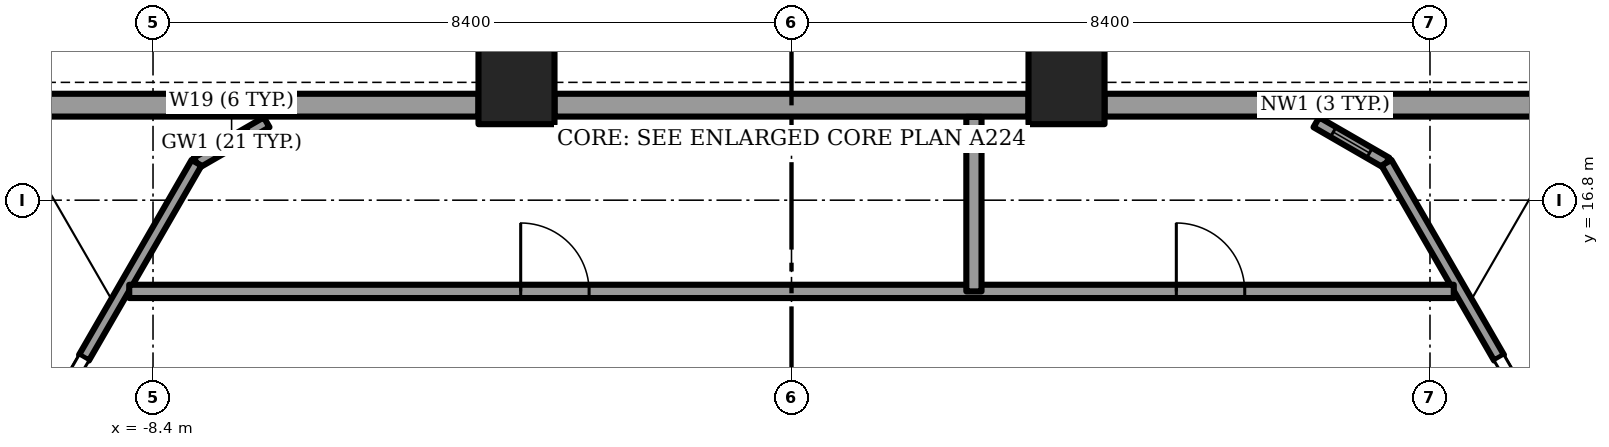
"""IFC4 building model, lengths in metres.
Left out: names, types, materials, properties, quantities, classifications, styles, units other than length and angle.
Written with IfcOpenShell. Run it as: python <this file> out.ifc"""

import sys

from ifc_helpers import new_model, si_unit, direction, frame, frame_2d, origin, origin_2d, place, context, subcontext, project, spatial, rectangle, extrude, element, fill, save


model = new_model("IFC4")
c1 = context("Model", 3, precision=1e-05, world=origin(), true_north=direction((0.0, 1.0)))
c2 = subcontext(c1, "Body", "Model", "MODEL_VIEW")
j1 = project(units=[si_unit("LENGTHUNIT", "METRE"), si_unit("PLANEANGLEUNIT", "RADIAN")], contexts=[c1])
p1 = place(None, origin())
s1 = spatial("IfcSite", under=j1, at=p1, CompositionType="ELEMENT")
p2 = place(p1, origin())
s2 = spatial("IfcBuilding", under=s1, at=p2, CompositionType="ELEMENT")
p3 = place(p2, frame((0.0, 0.0, 151.0)))
s3 = spatial("IfcBuildingStorey", under=s2, at=p3, CompositionType="ELEMENT", Elevation=151.0)
for number, where, z_axis, x_axis in (
    (1, (3.618, 18.3, -1.2), (0.0, 0.0, 1.0), (1.0, 0.0, 0.0)),
    (2, (-3.618, 18.3, -1.2), (0.0, 0.0, 1.0), (1.0, 0.0, 0.0)),
):
    element("IfcColumn", number, at=place(p3, frame(where, z_axis=z_axis, x_axis=x_axis)), inside=s3, PredefinedType="COLUMN", context=c2, shape_type="SweptSolid", body=[
        extrude(rectangle(XDim=1.0, YDim=1.0, at=origin_2d()), origin(), (0.0, 0.0, 1.0), 6.0),
    ])
p4 = place(p3, frame((9.919, 18.05, 0.0), z_axis=(0.0, 0.0, 1.0), x_axis=(-1.0, 0.0, 0.0)))
e3 = element("IfcWall", 3, at=p4, inside=s3, PredefinedType="SOLIDWALL", context=c2, shape_type="SweptSolid", body=[
    extrude(rectangle(XDim=5.801, YDim=0.3, at=frame_2d((2.9, 0.0))), origin(), (0.0, 0.0, 1.0), 4.8),
])
p5 = place(p3, frame((3.118, 18.05, 0.0), z_axis=(0.0, 0.0, 1.0), x_axis=(-1.0, 0.0, 0.0)))
e4 = element("IfcWall", 4, at=p5, inside=s3, PredefinedType="SOLIDWALL", context=c2, shape_type="SweptSolid", body=[
    extrude(rectangle(XDim=6.236, YDim=0.3, at=frame_2d((3.118, 0.0))), origin(), (0.0, 0.0, 1.0), 4.8),
])
p6 = place(p3, frame((-4.118, 18.05, 0.0), z_axis=(0.0, 0.0, 1.0), x_axis=(-1.0, 0.0, 0.0)))
e5 = element("IfcWall", 5, at=p6, inside=s3, PredefinedType="SOLIDWALL", context=c2, shape_type="SweptSolid", body=[
    extrude(rectangle(XDim=5.801, YDim=0.3, at=frame_2d((2.9, 0.0))), origin(), (0.0, 0.0, 1.0), 4.8),
])
for number, where, z_axis, x_axis in (
    (6, (-7.827, 17.292, 0.0), (0.0, 0.0, 1.0), (-0.5, -0.866, 0.0)),
    (7, (9.308, 14.727, 0.0), (0.0, 0.0, 1.0), (-0.5, 0.866, 0.0)),
):
    element("IfcWall", number, at=place(p3, frame(where, z_axis=z_axis, x_axis=x_axis)), inside=s3, PredefinedType="SOLIDWALL", context=c2, shape_type="SweptSolid", body=[
        extrude(rectangle(XDim=2.962, YDim=0.15, at=frame_2d((1.481, 0.0))), origin(), (0.0, 0.0, 1.0), 5.7),
    ])
p7 = place(p3, frame((-6.905, 17.825, 0.0), z_axis=(0.0, 0.0, 1.0), x_axis=(-0.866048165231, -0.499960573946, 0.0)))
e8 = element("IfcWall", 8, at=p7, inside=s3, PredefinedType="SOLIDWALL", context=c2, shape_type="SweptSolid", body=[
    extrude(rectangle(XDim=1.065, YDim=0.15, at=frame_2d((0.532, 0.0))), origin(), (0.0, 0.0, 1.0), 5.7),
])
p8 = place(p7, frame((0.258, 0.0, 0.15)))
e9 = element("IfcOpeningElement", 9, at=p8, cuts=e8, PredefinedType="OPENING", context=c2, shape_type="SweptSolid", body=[
    extrude(rectangle(XDim=0.55, YDim=5.1, at=frame_2d((0.275, 2.55))), frame((0.0, 0.075, 0.0), z_axis=(0.0, -1.0, 0.0), x_axis=(1.0, 0.0, 0.0)), (0.0, 0.0, 1.0), 0.15),
])
p9 = place(p3, frame((7.827, 17.292, 0.0), z_axis=(0.0, 0.0, 1.0), x_axis=(-0.866048165231, 0.499960573946, 0.0)))
e10 = element("IfcWall", 10, at=p9, inside=s3, PredefinedType="SOLIDWALL", context=c2, shape_type="SweptSolid", body=[
    extrude(rectangle(XDim=1.065, YDim=0.15, at=frame_2d((0.532, 0.0))), origin(), (0.0, 0.0, 1.0), 5.7),
])
p10 = place(p9, frame((0.258, 0.0, 0.15)))
e11 = element("IfcOpeningElement", 11, at=p10, cuts=e10, PredefinedType="OPENING", context=c2, shape_type="SweptSolid", body=[
    extrude(rectangle(XDim=0.55, YDim=5.1, at=frame_2d((0.275, 2.55))), frame((0.0, 0.075, 0.0), z_axis=(0.0, -1.0, 0.0), x_axis=(1.0, 0.0, 0.0)), (0.0, 0.0, 1.0), 0.15),
])
p11 = place(p3, frame((-8.713, 15.6, 0.0), z_axis=(0.0, 0.0, 1.0), x_axis=(1.0, 0.0, 0.0)))
e12 = element("IfcWall", 12, at=p11, inside=s3, PredefinedType="PARTITIONING", context=c2, shape_type="SweptSolid", body=[
    extrude(rectangle(XDim=17.426, YDim=0.175, at=frame_2d((8.713, 0.0))), origin(), (0.0, 0.0, 1.0), 5.7),
])
p12 = place(p11, frame((5.15, 0.0, 0.0)))
e13 = element("IfcOpeningElement", 13, at=p12, cuts=e12, PredefinedType="OPENING", context=c2, shape_type="SweptSolid", body=[
    extrude(rectangle(XDim=0.9, YDim=2.1, at=frame_2d((0.45, 1.05))), frame((0.0, 0.087, 0.0), z_axis=(0.0, -1.0, 0.0), x_axis=(1.0, 0.0, 0.0)), (0.0, 0.0, 1.0), 0.175),
])
p13 = place(p11, frame((13.776, 0.0, 0.0)))
e14 = element("IfcOpeningElement", 14, at=p13, cuts=e12, PredefinedType="OPENING", context=c2, shape_type="SweptSolid", body=[
    extrude(rectangle(XDim=0.9, YDim=2.1, at=frame_2d((0.45, 1.05))), frame((0.0, 0.087, 0.0), z_axis=(0.0, -1.0, 0.0), x_axis=(1.0, 0.0, 0.0)), (0.0, 0.0, 1.0), 0.175),
])
p14 = place(p3, frame((2.4, 15.6, 0.0), z_axis=(0.0, 0.0, 1.0), x_axis=(0.0, 1.0, 0.0)))
e15 = element("IfcWall", 15, at=p14, inside=s3, PredefinedType="PARTITIONING", context=c2, shape_type="SweptSolid", body=[
    extrude(rectangle(XDim=2.295, YDim=0.2, at=frame_2d((1.147, 0.0))), origin(), (0.0, 0.0, 1.0), 5.7),
])
p15 = place(p8, origin())
e16 = element("IfcWindow", 16, at=p15, inside=s3, PartitioningType="SINGLE_PANEL", PredefinedType="WINDOW", context=c2, shape_type="SweptSolid", body=[
    extrude(rectangle(XDim=0.55, YDim=5.1, at=frame_2d((0.275, 2.55))), frame((0.0, 0.03, 0.0), z_axis=(0.0, -1.0, 0.0), x_axis=(1.0, 0.0, 0.0)), (0.0, 0.0, 1.0), 0.06),
])
fill(e9, e16)
p16 = place(p10, origin())
e17 = element("IfcWindow", 17, at=p16, inside=s3, PartitioningType="SINGLE_PANEL", PredefinedType="WINDOW", context=c2, shape_type="SweptSolid", body=[
    extrude(rectangle(XDim=0.55, YDim=5.1, at=frame_2d((0.275, 2.55))), frame((0.0, 0.03, 0.0), z_axis=(0.0, -1.0, 0.0), x_axis=(1.0, 0.0, 0.0)), (0.0, 0.0, 1.0), 0.06),
])
fill(e11, e17)
p17 = place(p12, origin())
e18 = element("IfcDoor", 18, at=p17, inside=s3, OperationType="SINGLE_SWING_RIGHT", PredefinedType="DOOR", context=c2, shape_type="SweptSolid", body=[
    extrude(rectangle(XDim=0.9, YDim=2.1, at=frame_2d((0.45, 1.05))), frame((0.0, 0.025, 0.0), z_axis=(0.0, -1.0, 0.0), x_axis=(1.0, 0.0, 0.0)), (0.0, 0.0, 1.0), 0.05),
])
fill(e13, e18)
p18 = place(p13, origin())
e19 = element("IfcDoor", 19, at=p18, inside=s3, OperationType="SINGLE_SWING_LEFT", PredefinedType="DOOR", context=c2, shape_type="SweptSolid", body=[
    extrude(rectangle(XDim=0.9, YDim=2.1, at=frame_2d((0.45, 1.05))), frame((0.0, 0.025, 0.0), z_axis=(0.0, -1.0, 0.0), x_axis=(1.0, 0.0, 0.0)), (0.0, 0.0, 1.0), 0.05),
])
fill(e14, e19)
save(model, sys.argv[1])
